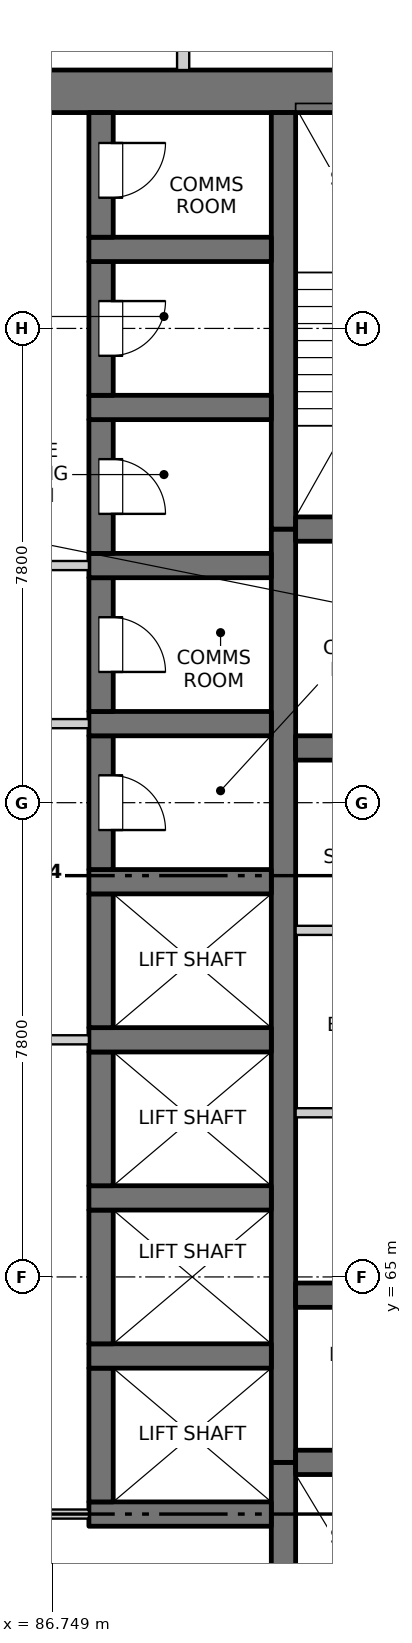
"""IFC4 building model, lengths in metres.
Left out: names, types, materials, properties, quantities, classifications, styles, units other than length and angle.
Written with IfcOpenShell. Run it as: python <this file> out.ifc"""

import sys

from ifc_helpers import new_model, si_unit, direction, frame, frame_2d, origin, place, context, subcontext, project, spatial, rectangle, extrude, element, fill, save


model = new_model("IFC4")
c1 = context("Model", 3, precision=1e-05, world=origin(), true_north=direction((0.0, 1.0)))
c2 = subcontext(c1, "Body", "Model", "MODEL_VIEW")
j1 = project(units=[si_unit("LENGTHUNIT", "METRE"), si_unit("PLANEANGLEUNIT", "RADIAN")], contexts=[c1])
p1 = place(None, origin())
s1 = spatial("IfcSite", under=j1, at=p1, CompositionType="ELEMENT")
p2 = place(p1, origin())
s2 = spatial("IfcBuilding", under=s1, at=p2, CompositionType="ELEMENT")
p3 = place(p2, frame((0.0, 0.0, 36.5)))
s3 = spatial("IfcBuildingStorey", under=s2, at=p3, CompositionType="ELEMENT", Elevation=36.5)
p4 = place(p3, frame((75.6, 84.5, -0.25), z_axis=(0.0, 0.0, 1.0), x_axis=(1.0, 0.0, 0.0)))
e1 = element("IfcWall", 1, at=p4, inside=s3, PredefinedType="SOLIDWALL", context=c2, shape_type="SweptSolid", body=[
    extrude(rectangle(XDim=18.8, YDim=0.7, at=frame_2d((9.4, 0.0))), origin(), (0.0, 0.0, 1.0), 3.4),
])
p5 = place(p3, frame((90.55, 55.6, -0.25), z_axis=(0.0, 0.0, 1.0), x_axis=(0.0, 1.0, 0.0)))
e2 = element("IfcWall", 2, at=p5, inside=s3, PredefinedType="SOLIDWALL", context=c2, shape_type="SweptSolid", body=[
    extrude(rectangle(XDim=6.35, YDim=0.4, at=frame_2d((3.175, 0.0))), origin(), (0.0, 0.0, 1.0), 3.4),
])
p6 = place(p3, frame((90.55, 61.95, -0.25), z_axis=(0.0, 0.0, 1.0), x_axis=(0.0, 1.0, 0.0)))
e3 = element("IfcWall", 3, at=p6, inside=s3, PredefinedType="SOLIDWALL", context=c2, shape_type="SweptSolid", body=[
    extrude(rectangle(XDim=15.35, YDim=0.4, at=frame_2d((7.675, 0.0))), origin(), (0.0, 0.0, 1.0), 3.4),
])
p7 = place(p3, frame((90.55, 77.3, -0.25), z_axis=(0.0, 0.0, 1.0), x_axis=(0.0, 1.0, 0.0)))
e4 = element("IfcWall", 4, at=p7, inside=s3, PredefinedType="SOLIDWALL", context=c2, shape_type="SweptSolid", body=[
    extrude(rectangle(XDim=6.85, YDim=0.4, at=frame_2d((3.425, 0.0))), origin(), (0.0, 0.0, 1.0), 3.4),
])
p8 = place(p3, frame((87.35, 61.1, -0.25), z_axis=(0.0, 0.0, 1.0), x_axis=(1.0, 0.0, 0.0)))
e5 = element("IfcWall", 5, at=p8, inside=s3, PredefinedType="SOLIDWALL", context=c2, shape_type="SweptSolid", body=[
    extrude(rectangle(XDim=3.0, YDim=0.4, at=frame_2d((1.5, 0.0))), origin(), (0.0, 0.0, 1.0), 3.4),
])
p9 = place(p3, frame((87.55, 61.3, -0.25), z_axis=(0.0, 0.0, 1.0), x_axis=(0.0, 1.0, 0.0)))
e6 = element("IfcWall", 6, at=p9, inside=s3, PredefinedType="SOLIDWALL", context=c2, shape_type="SweptSolid", body=[
    extrude(rectangle(XDim=2.2, YDim=0.4, at=frame_2d((1.1, 0.0))), origin(), (0.0, 0.0, 1.0), 3.4),
])
p10 = place(p3, frame((87.35, 63.7, -0.25), z_axis=(0.0, 0.0, 1.0), x_axis=(1.0, 0.0, 0.0)))
e7 = element("IfcWall", 7, at=p10, inside=s3, PredefinedType="SOLIDWALL", context=c2, shape_type="SweptSolid", body=[
    extrude(rectangle(XDim=3.0, YDim=0.4, at=frame_2d((1.5, 0.0))), origin(), (0.0, 0.0, 1.0), 3.4),
])
p11 = place(p3, frame((87.55, 63.9, -0.25), z_axis=(0.0, 0.0, 1.0), x_axis=(0.0, 1.0, 0.0)))
e8 = element("IfcWall", 8, at=p11, inside=s3, PredefinedType="SOLIDWALL", context=c2, shape_type="SweptSolid", body=[
    extrude(rectangle(XDim=2.2, YDim=0.4, at=frame_2d((1.1, 0.0))), origin(), (0.0, 0.0, 1.0), 3.4),
])
p12 = place(p3, frame((87.35, 66.3, -0.25), z_axis=(0.0, 0.0, 1.0), x_axis=(1.0, 0.0, 0.0)))
e9 = element("IfcWall", 9, at=p12, inside=s3, PredefinedType="SOLIDWALL", context=c2, shape_type="SweptSolid", body=[
    extrude(rectangle(XDim=3.0, YDim=0.4, at=frame_2d((1.5, 0.0))), origin(), (0.0, 0.0, 1.0), 3.4),
])
p13 = place(p3, frame((87.55, 66.5, -0.25), z_axis=(0.0, 0.0, 1.0), x_axis=(0.0, 1.0, 0.0)))
e10 = element("IfcWall", 10, at=p13, inside=s3, PredefinedType="SOLIDWALL", context=c2, shape_type="SweptSolid", body=[
    extrude(rectangle(XDim=2.2, YDim=0.4, at=frame_2d((1.1, 0.0))), origin(), (0.0, 0.0, 1.0), 3.4),
])
p14 = place(p3, frame((87.35, 68.9, -0.25), z_axis=(0.0, 0.0, 1.0), x_axis=(1.0, 0.0, 0.0)))
e11 = element("IfcWall", 11, at=p14, inside=s3, PredefinedType="SOLIDWALL", context=c2, shape_type="SweptSolid", body=[
    extrude(rectangle(XDim=3.0, YDim=0.4, at=frame_2d((1.5, 0.0))), origin(), (0.0, 0.0, 1.0), 3.4),
])
p15 = place(p3, frame((87.55, 69.1, -0.25), z_axis=(0.0, 0.0, 1.0), x_axis=(0.0, 1.0, 0.0)))
e12 = element("IfcWall", 12, at=p15, inside=s3, PredefinedType="SOLIDWALL", context=c2, shape_type="SweptSolid", body=[
    extrude(rectangle(XDim=2.2, YDim=0.4, at=frame_2d((1.1, 0.0))), origin(), (0.0, 0.0, 1.0), 3.4),
])
p16 = place(p3, frame((87.35, 71.5, -0.25), z_axis=(0.0, 0.0, 1.0), x_axis=(1.0, 0.0, 0.0)))
e13 = element("IfcWall", 13, at=p16, inside=s3, PredefinedType="SOLIDWALL", context=c2, shape_type="SweptSolid", body=[
    extrude(rectangle(XDim=3.0, YDim=0.4, at=frame_2d((1.5, 0.0))), origin(), (0.0, 0.0, 1.0), 3.4),
])
p17 = place(p3, frame((87.55, 71.7, -0.25), z_axis=(0.0, 0.0, 1.0), x_axis=(0.0, 1.0, 0.0)))
e14 = element("IfcWall", 14, at=p17, inside=s3, PredefinedType="SOLIDWALL", context=c2, shape_type="SweptSolid", body=[
    extrude(rectangle(XDim=2.2, YDim=0.4, at=frame_2d((1.1, 0.0))), origin(), (0.0, 0.0, 1.0), 3.4),
])
p18 = place(p17, frame((0.65, 0.0, 0.25)))
e15 = element("IfcOpeningElement", 15, at=p18, cuts=e14, PredefinedType="OPENING", context=c2, shape_type="SweptSolid", body=[
    extrude(rectangle(XDim=0.9, YDim=2.1, at=frame_2d((0.45, 1.05))), frame((0.0, 0.21, 0.0), z_axis=(0.0, -1.0, 0.0), x_axis=(1.0, 0.0, 0.0)), (0.0, 0.0, 1.0), 0.42),
])
p19 = place(p3, frame((87.35, 74.1, -0.25), z_axis=(0.0, 0.0, 1.0), x_axis=(1.0, 0.0, 0.0)))
e16 = element("IfcWall", 16, at=p19, inside=s3, PredefinedType="SOLIDWALL", context=c2, shape_type="SweptSolid", body=[
    extrude(rectangle(XDim=3.0, YDim=0.4, at=frame_2d((1.5, 0.0))), origin(), (0.0, 0.0, 1.0), 3.4),
])
p20 = place(p3, frame((87.55, 74.3, -0.25), z_axis=(0.0, 0.0, 1.0), x_axis=(0.0, 1.0, 0.0)))
e17 = element("IfcWall", 17, at=p20, inside=s3, PredefinedType="SOLIDWALL", context=c2, shape_type="SweptSolid", body=[
    extrude(rectangle(XDim=2.2, YDim=0.4, at=frame_2d((1.1, 0.0))), origin(), (0.0, 0.0, 1.0), 3.4),
])
p21 = place(p20, frame((0.65, 0.0, 0.25)))
e18 = element("IfcOpeningElement", 18, at=p21, cuts=e17, PredefinedType="OPENING", context=c2, shape_type="SweptSolid", body=[
    extrude(rectangle(XDim=0.9, YDim=2.1, at=frame_2d((0.45, 1.05))), frame((0.0, 0.21, 0.0), z_axis=(0.0, -1.0, 0.0), x_axis=(1.0, 0.0, 0.0)), (0.0, 0.0, 1.0), 0.42),
])
p22 = place(p3, frame((87.35, 76.7, -0.25), z_axis=(0.0, 0.0, 1.0), x_axis=(1.0, 0.0, 0.0)))
e19 = element("IfcWall", 19, at=p22, inside=s3, PredefinedType="SOLIDWALL", context=c2, shape_type="SweptSolid", body=[
    extrude(rectangle(XDim=3.0, YDim=0.4, at=frame_2d((1.5, 0.0))), origin(), (0.0, 0.0, 1.0), 3.4),
])
p23 = place(p3, frame((87.55, 76.9, -0.25), z_axis=(0.0, 0.0, 1.0), x_axis=(0.0, 1.0, 0.0)))
e20 = element("IfcWall", 20, at=p23, inside=s3, PredefinedType="SOLIDWALL", context=c2, shape_type="SweptSolid", body=[
    extrude(rectangle(XDim=2.2, YDim=0.4, at=frame_2d((1.1, 0.0))), origin(), (0.0, 0.0, 1.0), 3.4),
])
p24 = place(p23, frame((0.65, 0.0, 0.25)))
e21 = element("IfcOpeningElement", 21, at=p24, cuts=e20, PredefinedType="OPENING", context=c2, shape_type="SweptSolid", body=[
    extrude(rectangle(XDim=0.9, YDim=2.1, at=frame_2d((0.45, 1.05))), frame((0.0, 0.21, 0.0), z_axis=(0.0, -1.0, 0.0), x_axis=(1.0, 0.0, 0.0)), (0.0, 0.0, 1.0), 0.42),
])
p25 = place(p3, frame((87.35, 79.3, -0.25), z_axis=(0.0, 0.0, 1.0), x_axis=(1.0, 0.0, 0.0)))
e22 = element("IfcWall", 22, at=p25, inside=s3, PredefinedType="SOLIDWALL", context=c2, shape_type="SweptSolid", body=[
    extrude(rectangle(XDim=3.0, YDim=0.4, at=frame_2d((1.5, 0.0))), origin(), (0.0, 0.0, 1.0), 3.4),
])
p26 = place(p3, frame((87.55, 79.5, -0.25), z_axis=(0.0, 0.0, 1.0), x_axis=(0.0, 1.0, 0.0)))
e23 = element("IfcWall", 23, at=p26, inside=s3, PredefinedType="SOLIDWALL", context=c2, shape_type="SweptSolid", body=[
    extrude(rectangle(XDim=2.2, YDim=0.4, at=frame_2d((1.1, 0.0))), origin(), (0.0, 0.0, 1.0), 3.4),
])
p27 = place(p26, frame((0.65, 0.0, 0.25)))
e24 = element("IfcOpeningElement", 24, at=p27, cuts=e23, PredefinedType="OPENING", context=c2, shape_type="SweptSolid", body=[
    extrude(rectangle(XDim=0.9, YDim=2.1, at=frame_2d((0.45, 1.05))), frame((0.0, 0.21, 0.0), z_axis=(0.0, -1.0, 0.0), x_axis=(1.0, 0.0, 0.0)), (0.0, 0.0, 1.0), 0.42),
])
p28 = place(p3, frame((87.35, 81.9, -0.25), z_axis=(0.0, 0.0, 1.0), x_axis=(1.0, 0.0, 0.0)))
e25 = element("IfcWall", 25, at=p28, inside=s3, PredefinedType="SOLIDWALL", context=c2, shape_type="SweptSolid", body=[
    extrude(rectangle(XDim=3.0, YDim=0.4, at=frame_2d((1.5, 0.0))), origin(), (0.0, 0.0, 1.0), 3.4),
])
p29 = place(p3, frame((87.55, 82.1, -0.25), z_axis=(0.0, 0.0, 1.0), x_axis=(0.0, 1.0, 0.0)))
e26 = element("IfcWall", 26, at=p29, inside=s3, PredefinedType="SOLIDWALL", context=c2, shape_type="SweptSolid", body=[
    extrude(rectangle(XDim=2.05, YDim=0.4, at=frame_2d((1.025, 0.0))), origin(), (0.0, 0.0, 1.0), 3.4),
])
p30 = place(p29, frame((0.65, 0.0, 0.25)))
e27 = element("IfcOpeningElement", 27, at=p30, cuts=e26, PredefinedType="OPENING", context=c2, shape_type="SweptSolid", body=[
    extrude(rectangle(XDim=0.9, YDim=2.1, at=frame_2d((0.45, 1.05))), frame((0.0, 0.21, 0.0), z_axis=(0.0, -1.0, 0.0), x_axis=(1.0, 0.0, 0.0)), (0.0, 0.0, 1.0), 0.42),
])
for number, where, z_axis, x_axis in (
    (28, (90.75, 61.95, -0.25), (0.0, 0.0, 1.0), (1.0, 0.0, 0.0)),
    (29, (90.75, 64.7, -0.25), (0.0, 0.0, 1.0), (1.0, 0.0, 0.0)),
    (30, (90.75, 73.7, -0.25), (0.0, 0.0, 1.0), (1.0, 0.0, 0.0)),
    (31, (90.75, 77.3, -0.25), (0.0, 0.0, 1.0), (1.0, 0.0, 0.0)),
):
    element("IfcWall", number, at=place(p3, frame(where, z_axis=z_axis, x_axis=x_axis)), inside=s3, PredefinedType="SOLIDWALL", context=c2, shape_type="SweptSolid", body=[
        extrude(rectangle(XDim=3.65, YDim=0.4, at=frame_2d((1.825, 0.0))), origin(), (0.0, 0.0, 1.0), 3.4),
    ])
p31 = place(p3, frame((82.65, 61.1, 0.0), z_axis=(0.0, 0.0, 1.0), x_axis=(1.0, 0.0, 0.0)))
e32 = element("IfcWall", 32, at=p31, inside=s3, PredefinedType="PARTITIONING", context=c2, shape_type="SweptSolid", body=[
    extrude(rectangle(XDim=4.7, YDim=0.15, at=frame_2d((2.35, 0.0))), origin(), (0.0, 0.0, 1.0), 3.15),
])
p32 = place(p31, frame((1.45, 0.0, 0.0)))
e33 = element("IfcOpeningElement", 33, at=p32, cuts=e32, PredefinedType="OPENING", context=c2, shape_type="SweptSolid", body=[
    extrude(rectangle(XDim=1.8, YDim=2.1, at=frame_2d((0.9, 1.05))), frame((0.0, 0.085, 0.0), z_axis=(0.0, -1.0, 0.0), x_axis=(1.0, 0.0, 0.0)), (0.0, 0.0, 1.0), 0.17),
])
p33 = place(p3, frame((90.75, 67.7, 0.0), z_axis=(0.0, 0.0, 1.0), x_axis=(1.0, 0.0, 0.0)))
e34 = element("IfcWall", 34, at=p33, inside=s3, PredefinedType="PARTITIONING", context=c2, shape_type="SweptSolid", body=[
    extrude(rectangle(XDim=3.65, YDim=0.15, at=frame_2d((1.825, 0.0))), origin(), (0.0, 0.0, 1.0), 3.15),
])
p34 = place(p3, frame((82.65, 68.9, 0.0), z_axis=(0.0, 0.0, 1.0), x_axis=(1.0, 0.0, 0.0)))
e35 = element("IfcWall", 35, at=p34, inside=s3, PredefinedType="PARTITIONING", context=c2, shape_type="SweptSolid", body=[
    extrude(rectangle(XDim=4.7, YDim=0.15, at=frame_2d((2.35, 0.0))), origin(), (0.0, 0.0, 1.0), 3.15),
])
p35 = place(p34, frame((1.45, 0.0, 0.0)))
e36 = element("IfcOpeningElement", 36, at=p35, cuts=e35, PredefinedType="OPENING", context=c2, shape_type="SweptSolid", body=[
    extrude(rectangle(XDim=1.8, YDim=2.1, at=frame_2d((0.9, 1.05))), frame((0.0, 0.085, 0.0), z_axis=(0.0, -1.0, 0.0), x_axis=(1.0, 0.0, 0.0)), (0.0, 0.0, 1.0), 0.17),
])
p36 = place(p3, frame((90.75, 70.7, 0.0), z_axis=(0.0, 0.0, 1.0), x_axis=(1.0, 0.0, 0.0)))
e37 = element("IfcWall", 37, at=p36, inside=s3, PredefinedType="PARTITIONING", context=c2, shape_type="SweptSolid", body=[
    extrude(rectangle(XDim=3.65, YDim=0.15, at=frame_2d((1.825, 0.0))), origin(), (0.0, 0.0, 1.0), 3.15),
])
p37 = place(p3, frame((82.65, 74.1, 0.0), z_axis=(0.0, 0.0, 1.0), x_axis=(1.0, 0.0, 0.0)))
e38 = element("IfcWall", 38, at=p37, inside=s3, PredefinedType="PARTITIONING", context=c2, shape_type="SweptSolid", body=[
    extrude(rectangle(XDim=4.7, YDim=0.15, at=frame_2d((2.35, 0.0))), origin(), (0.0, 0.0, 1.0), 3.15),
])
p38 = place(p37, frame((1.45, 0.0, 0.0)))
e39 = element("IfcOpeningElement", 39, at=p38, cuts=e38, PredefinedType="OPENING", context=c2, shape_type="SweptSolid", body=[
    extrude(rectangle(XDim=1.8, YDim=2.1, at=frame_2d((0.9, 1.05))), frame((0.0, 0.085, 0.0), z_axis=(0.0, -1.0, 0.0), x_axis=(1.0, 0.0, 0.0)), (0.0, 0.0, 1.0), 0.17),
])
p39 = place(p3, frame((82.65, 76.7, 0.0), z_axis=(0.0, 0.0, 1.0), x_axis=(1.0, 0.0, 0.0)))
e40 = element("IfcWall", 40, at=p39, inside=s3, PredefinedType="PARTITIONING", context=c2, shape_type="SweptSolid", body=[
    extrude(rectangle(XDim=4.7, YDim=0.15, at=frame_2d((2.35, 0.0))), origin(), (0.0, 0.0, 1.0), 3.15),
])
p40 = place(p39, frame((1.45, 0.0, 0.0)))
e41 = element("IfcOpeningElement", 41, at=p40, cuts=e40, PredefinedType="OPENING", context=c2, shape_type="SweptSolid", body=[
    extrude(rectangle(XDim=1.8, YDim=2.1, at=frame_2d((0.9, 1.05))), frame((0.0, 0.085, 0.0), z_axis=(0.0, -1.0, 0.0), x_axis=(1.0, 0.0, 0.0)), (0.0, 0.0, 1.0), 0.17),
])
p41 = place(p3, frame((88.9, 84.85, 0.0), z_axis=(0.0, 0.0, 1.0), x_axis=(0.0, 1.0, 0.0)))
e42 = element("IfcWall", 42, at=p41, inside=s3, PredefinedType="PARTITIONING", context=c2, shape_type="SweptSolid", body=[
    extrude(rectangle(XDim=3.25, YDim=0.2, at=frame_2d((1.625, 0.0))), origin(), (0.0, 0.0, 1.0), 3.15),
])
p42 = place(p18, origin())
e43 = element("IfcDoor", 43, at=p42, inside=s3, OperationType="SINGLE_SWING_RIGHT", PredefinedType="DOOR", context=c2, shape_type="SweptSolid", body=[
    extrude(rectangle(XDim=0.9, YDim=2.1, at=frame_2d((0.45, 1.05))), frame((0.0, -0.135, 0.0), z_axis=(0.0, -1.0, 0.0), x_axis=(1.0, 0.0, 0.0)), (0.0, 0.0, 1.0), 0.05),
])
fill(e15, e43)
p43 = place(p21, origin())
e44 = element("IfcDoor", 44, at=p43, inside=s3, OperationType="SINGLE_SWING_RIGHT", PredefinedType="DOOR", context=c2, shape_type="SweptSolid", body=[
    extrude(rectangle(XDim=0.9, YDim=2.1, at=frame_2d((0.45, 1.05))), frame((0.0, -0.135, 0.0), z_axis=(0.0, -1.0, 0.0), x_axis=(1.0, 0.0, 0.0)), (0.0, 0.0, 1.0), 0.05),
])
fill(e18, e44)
p44 = place(p24, origin())
e45 = element("IfcDoor", 45, at=p44, inside=s3, OperationType="SINGLE_SWING_RIGHT", PredefinedType="DOOR", context=c2, shape_type="SweptSolid", body=[
    extrude(rectangle(XDim=0.9, YDim=2.1, at=frame_2d((0.45, 1.05))), frame((0.0, -0.135, 0.0), z_axis=(0.0, -1.0, 0.0), x_axis=(1.0, 0.0, 0.0)), (0.0, 0.0, 1.0), 0.05),
])
fill(e21, e45)
p45 = place(p27, origin())
e46 = element("IfcDoor", 46, at=p45, inside=s3, OperationType="SINGLE_SWING_LEFT", PredefinedType="DOOR", context=c2, shape_type="SweptSolid", body=[
    extrude(rectangle(XDim=0.9, YDim=2.1, at=frame_2d((0.45, 1.05))), frame((0.0, -0.135, 0.0), z_axis=(0.0, -1.0, 0.0), x_axis=(1.0, 0.0, 0.0)), (0.0, 0.0, 1.0), 0.05),
])
fill(e24, e46)
p46 = place(p30, origin())
e47 = element("IfcDoor", 47, at=p46, inside=s3, OperationType="SINGLE_SWING_LEFT", PredefinedType="DOOR", context=c2, shape_type="SweptSolid", body=[
    extrude(rectangle(XDim=0.9, YDim=2.1, at=frame_2d((0.45, 1.05))), frame((0.0, -0.135, 0.0), z_axis=(0.0, -1.0, 0.0), x_axis=(1.0, 0.0, 0.0)), (0.0, 0.0, 1.0), 0.05),
])
fill(e27, e47)
save(model, sys.argv[1])
